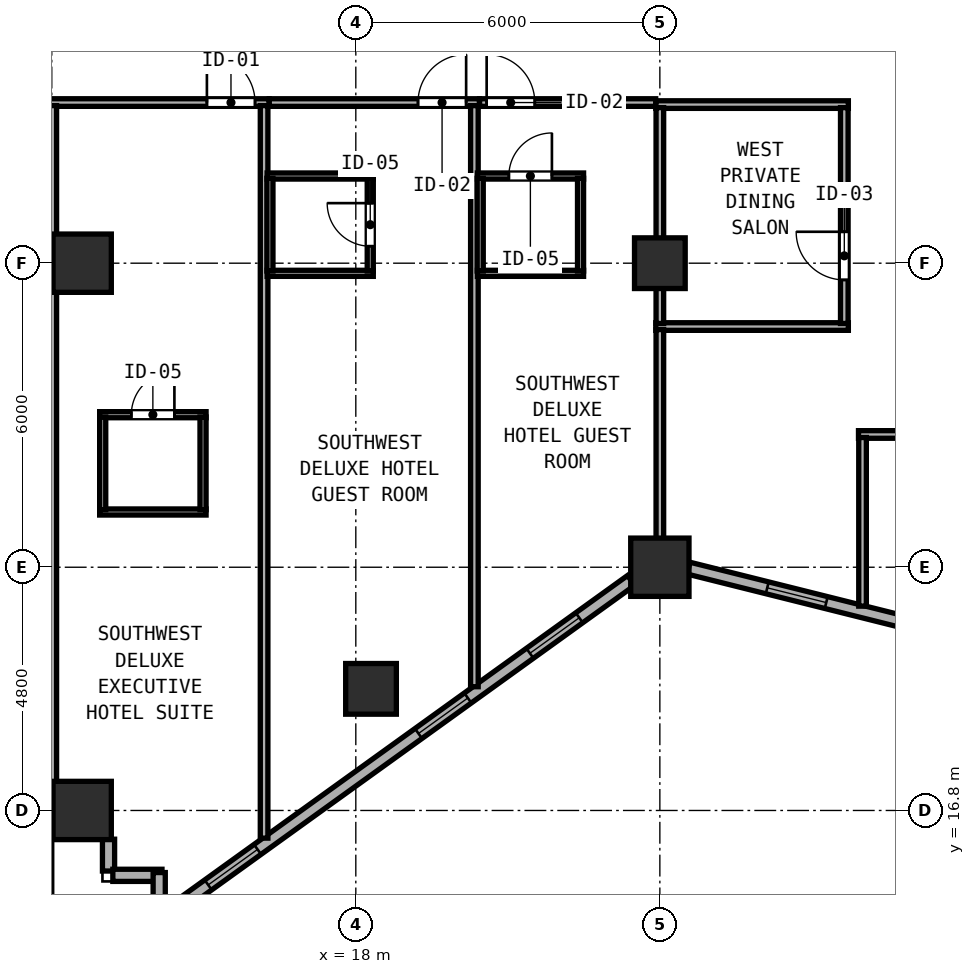
"""IFC4 building model, lengths in metres.
Left out: names, types, materials, properties, quantities, classifications, styles, units other than length and angle.
Written with IfcOpenShell. Run it as: python <this file> out.ifc"""

import sys

from ifc_helpers import new_model, si_unit, direction, frame, frame_2d, origin, origin_2d, place, context, subcontext, project, spatial, rectangle, hollow_rectangle, extrude, element, fill, save


model = new_model("IFC4")
c1 = context("Model", 3, precision=1e-05, world=origin(), true_north=direction((0.0, 1.0)))
c2 = subcontext(c1, "Body", "Model", "MODEL_VIEW")
j1 = project(units=[si_unit("LENGTHUNIT", "METRE"), si_unit("PLANEANGLEUNIT", "RADIAN")], contexts=[c1])
p1 = place(None, origin())
s1 = spatial("IfcSite", under=j1, at=p1, CompositionType="ELEMENT")
p2 = place(p1, origin())
s2 = spatial("IfcBuilding", under=s1, at=p2, CompositionType="ELEMENT")
p3 = place(p2, frame((0.0, 0.0, 85.6)))
s3 = spatial("IfcBuildingStorey", under=s2, at=p3, CompositionType="ELEMENT", Elevation=85.6)
for number, where, z_axis, x_axis in (
    (1, (24.0, 21.6, 0.0), (0.0, 0.0, 1.0), (1.0, 0.0, 0.0)),
    (2, (12.6, 16.8, 0.0), (0.0, 0.0, 1.0), (1.0, 0.0, 0.0)),
    (3, (12.6, 27.6, 0.0), (0.0, 0.0, 1.0), (1.0, 0.0, 0.0)),
):
    element("IfcColumn", number, at=place(p3, frame(where, z_axis=z_axis, x_axis=x_axis)), inside=s3, PredefinedType="COLUMN", context=c2, shape_type="SweptSolid", body=[
        extrude(hollow_rectangle(XDim=1.15, YDim=1.15, WallThickness=0.042, at=origin_2d()), origin(), (0.0, 0.0, 1.0), 3.8),
    ])
for number, where, z_axis, x_axis in (
    (4, (24.0, 27.6, 0.0), (0.0, 0.0, 1.0), (1.0, 0.0, 0.0)),
    (5, (18.3, 19.2, 0.0), (0.0, 0.0, 1.0), (1.0, 0.0, 0.0)),
):
    element("IfcColumn", number, at=place(p3, frame(where, z_axis=z_axis, x_axis=x_axis)), inside=s3, PredefinedType="COLUMN", context=c2, shape_type="SweptSolid", body=[
        extrude(hollow_rectangle(XDim=1.0, YDim=1.0, WallThickness=0.038, at=origin_2d()), origin(), (0.0, 0.0, 1.0), 3.8),
    ])
p4 = place(p3, frame((13.12, 16.233, 0.0), z_axis=(0.0, 0.0, 1.0), x_axis=(0.0, -1.0, 0.0)))
e6 = element("IfcWall", 6, at=p4, inside=s3, PredefinedType="SOLIDWALL", context=c2, shape_type="SweptSolid", body=[
    extrude(rectangle(XDim=0.628, YDim=0.24, at=frame_2d((0.314, 0.0))), origin(), (0.0, 0.0, 1.0), 3.54),
])
p5 = place(p3, frame((13.205, 15.52, 0.0), z_axis=(0.0, 0.0, 1.0), x_axis=(1.0, 0.0, 0.0)))
e7 = element("IfcWall", 7, at=p5, inside=s3, PredefinedType="SOLIDWALL", context=c2, shape_type="SweptSolid", body=[
    extrude(rectangle(XDim=0.97, YDim=0.24, at=frame_2d((0.485, 0.0))), origin(), (0.0, 0.0, 1.0), 3.54),
])
p6 = place(p3, frame((14.12, 15.575, 0.0), z_axis=(0.0, 0.0, 1.0), x_axis=(0.0, -1.0, 0.0)))
e8 = element("IfcWall", 8, at=p6, inside=s3, PredefinedType="SOLIDWALL", context=c2, shape_type="SweptSolid", body=[
    extrude(rectangle(XDim=0.996, YDim=0.24, at=frame_2d((0.498, 0.0))), origin(), (0.0, 0.0, 1.0), 3.54),
])
p7 = place(p3, frame((14.075, 14.602, 0.0), z_axis=(0.0, 0.0, 1.0), x_axis=(0.811543176492, 0.58429245476, 0.0)))
e9 = element("IfcWall", 9, at=p7, inside=s3, PredefinedType="SOLIDWALL", context=c2, shape_type="SweptSolid", body=[
    extrude(rectangle(XDim=11.531, YDim=0.24, at=frame_2d((5.765, 0.0))), origin(), (0.0, 0.0, 1.0), 3.037),
])
p8 = place(p7, frame((1.246, 0.0, 0.85)))
e10 = element("IfcOpeningElement", 10, at=p8, cuts=e9, PredefinedType="OPENING", context=c2, shape_type="SweptSolid", body=[
    extrude(rectangle(XDim=1.2, YDim=1.85, at=frame_2d((0.6, 0.925))), frame((0.0, 0.13, 0.0), z_axis=(0.0, -1.0, 0.0), x_axis=(1.0, 0.0, 0.0)), (0.0, 0.0, 1.0), 0.26),
])
p9 = place(p7, frame((6.36, 0.0, 0.85)))
e11 = element("IfcOpeningElement", 11, at=p9, cuts=e9, PredefinedType="OPENING", context=c2, shape_type="SweptSolid", body=[
    extrude(rectangle(XDim=1.2, YDim=1.85, at=frame_2d((0.6, 0.925))), frame((0.0, 0.13, 0.0), z_axis=(0.0, -1.0, 0.0), x_axis=(1.0, 0.0, 0.0)), (0.0, 0.0, 1.0), 0.26),
])
p10 = place(p7, frame((9.07, 0.0, 0.85)))
e12 = element("IfcOpeningElement", 12, at=p10, cuts=e9, PredefinedType="OPENING", context=c2, shape_type="SweptSolid", body=[
    extrude(rectangle(XDim=1.2, YDim=1.85, at=frame_2d((0.6, 0.925))), frame((0.0, 0.13, 0.0), z_axis=(0.0, -1.0, 0.0), x_axis=(1.0, 0.0, 0.0)), (0.0, 0.0, 1.0), 0.26),
])
p11 = place(p3, frame((24.567, 21.582, 0.0), z_axis=(0.0, 0.0, 1.0), x_axis=(0.970148978127, -0.24250971164, 0.0)))
e13 = element("IfcWall", 13, at=p11, inside=s3, PredefinedType="SOLIDWALL", context=c2, shape_type="SweptSolid", body=[
    extrude(rectangle(XDim=4.434, YDim=0.24, at=frame_2d((2.217, 0.0))), origin(), (0.0, 0.0, 1.0), 3.037),
])
p12 = place(p11, frame((1.6, 0.0, 0.85)))
e14 = element("IfcOpeningElement", 14, at=p12, cuts=e13, PredefinedType="OPENING", context=c2, shape_type="SweptSolid", body=[
    extrude(rectangle(XDim=1.2, YDim=1.85, at=frame_2d((0.6, 0.925))), frame((0.0, 0.13, 0.0), z_axis=(0.0, -1.0, 0.0), x_axis=(1.0, 0.0, 0.0)), (0.0, 0.0, 1.0), 0.26),
])
p13 = place(p3, frame((12.173, 33.524, 0.0), z_axis=(0.0, 0.0, 1.0), x_axis=(-0.963197271032, -0.268795493036, 0.0)))
e15 = element("IfcWall", 15, at=p13, inside=s3, PredefinedType="SOLIDWALL", context=c2, shape_type="SweptSolid", body=[
    extrude(rectangle(XDim=9.095, YDim=0.24, at=frame_2d((4.548, 0.0))), origin(), (0.0, 0.0, 1.0), 3.54),
])
p14 = place(p13, frame((1.6, 0.0, 0.85)))
e16 = element("IfcOpeningElement", 16, at=p14, cuts=e15, PredefinedType="OPENING", context=c2, shape_type="SweptSolid", body=[
    extrude(rectangle(XDim=1.2, YDim=1.85, at=frame_2d((0.6, 0.925))), frame((0.0, 0.13, 0.0), z_axis=(0.0, -1.0, 0.0), x_axis=(1.0, 0.0, 0.0)), (0.0, 0.0, 1.0), 0.26),
])
p15 = place(p13, frame((7.0, 0.0, 0.85)))
e17 = element("IfcOpeningElement", 17, at=p15, cuts=e15, PredefinedType="OPENING", context=c2, shape_type="SweptSolid", body=[
    extrude(rectangle(XDim=1.2, YDim=1.85, at=frame_2d((0.6, 0.925))), frame((0.0, 0.13, 0.0), z_axis=(0.0, -1.0, 0.0), x_axis=(1.0, 0.0, 0.0)), (0.0, 0.0, 1.0), 0.26),
])
for number, where, z_axis, x_axis in (
    (18, (23.92, 30.73, 0.0), (0.0, 0.0, 1.0), (1.0, 0.0, 0.0)),
    (19, (23.92, 26.35, 0.0), (0.0, 0.0, 1.0), (1.0, 0.0, 0.0)),
):
    element("IfcWall", number, at=place(p3, frame(where, z_axis=z_axis, x_axis=x_axis)), inside=s3, PredefinedType="PARTITIONING", context=c2, shape_type="SweptSolid", body=[
        extrude(rectangle(XDim=3.8, YDim=0.15, at=frame_2d((1.9, 0.0))), origin(), (0.0, 0.0, 1.0), 3.54),
    ])
p16 = place(p3, frame((24.0, 26.41, 0.0), z_axis=(0.0, 0.0, 1.0), x_axis=(0.0, 1.0, 0.0)))
e20 = element("IfcWall", 20, at=p16, inside=s3, PredefinedType="PARTITIONING", context=c2, shape_type="SweptSolid", body=[
    extrude(rectangle(XDim=4.26, YDim=0.15, at=frame_2d((2.13, 0.0))), origin(), (0.0, 0.0, 1.0), 3.037),
])
p17 = place(p3, frame((27.64, 26.41, 0.0), z_axis=(0.0, 0.0, 1.0), x_axis=(0.0, 1.0, 0.0)))
e21 = element("IfcWall", 21, at=p17, inside=s3, PredefinedType="PARTITIONING", context=c2, shape_type="SweptSolid", body=[
    extrude(rectangle(XDim=4.26, YDim=0.15, at=frame_2d((2.13, 0.0))), origin(), (0.0, 0.0, 1.0), 3.54),
])
p18 = place(p17, frame((1.81, 0.0, 0.0), z_axis=(0.0, 0.0, 1.0), x_axis=(-1.0, 0.0, 0.0)))
e22 = element("IfcOpeningElement", 22, at=p18, cuts=e21, PredefinedType="OPENING", context=c2, shape_type="SweptSolid", body=[
    extrude(rectangle(XDim=0.95, YDim=2.12, at=frame_2d((0.475, 1.06))), frame((0.0, 0.085, 0.0), z_axis=(0.0, -1.0, 0.0), x_axis=(1.0, 0.0, 0.0)), (0.0, 0.0, 1.0), 0.17),
])
p19 = place(p3, frame((27.92, 24.22, 0.0), z_axis=(0.0, 0.0, 1.0), x_axis=(1.0, 0.0, 0.0)))
e23 = element("IfcWall", 23, at=p19, inside=s3, PredefinedType="PARTITIONING", context=c2, shape_type="SweptSolid", body=[
    extrude(rectangle(XDim=7.36, YDim=0.15, at=frame_2d((3.68, 0.0))), origin(), (0.0, 0.0, 1.0), 3.54),
])
p20 = place(p19, frame((4.075, 0.0, 0.0), z_axis=(0.0, 0.0, 1.0), x_axis=(-1.0, 0.0, 0.0)))
e24 = element("IfcOpeningElement", 24, at=p20, cuts=e23, PredefinedType="OPENING", context=c2, shape_type="SweptSolid", body=[
    extrude(rectangle(XDim=0.95, YDim=2.12, at=frame_2d((0.475, 1.06))), frame((0.0, 0.085, 0.0), z_axis=(0.0, -1.0, 0.0), x_axis=(1.0, 0.0, 0.0)), (0.0, 0.0, 1.0), 0.17),
])
p21 = place(p3, frame((28.0, 20.832, 0.0), z_axis=(0.0, 0.0, 1.0), x_axis=(0.0, 1.0, 0.0)))
e25 = element("IfcWall", 25, at=p21, inside=s3, PredefinedType="PARTITIONING", context=c2, shape_type="SweptSolid", body=[
    extrude(rectangle(XDim=3.328, YDim=0.15, at=frame_2d((1.664, 0.0))), origin(), (0.0, 0.0, 1.0), 3.54),
])
p22 = place(p3, frame((11.7, 30.77, 0.0), z_axis=(0.0, 0.0, 1.0), x_axis=(1.0, 0.0, 0.0)))
e26 = element("IfcWall", 26, at=p22, inside=s3, PredefinedType="PARTITIONING", context=c2, shape_type="SweptSolid", body=[
    extrude(rectangle(XDim=4.59, YDim=0.15, at=frame_2d((2.295, 0.0))), origin(), (0.0, 0.0, 1.0), 3.54),
])
p23 = place(p22, frame((4.311, 0.0, 0.0), z_axis=(0.0, 0.0, 1.0), x_axis=(-1.0, 0.0, 0.0)))
e27 = element("IfcOpeningElement", 27, at=p23, cuts=e26, PredefinedType="OPENING", context=c2, shape_type="SweptSolid", body=[
    extrude(rectangle(XDim=0.95, YDim=2.18, at=frame_2d((0.475, 1.09))), frame((0.0, 0.085, 0.0), z_axis=(0.0, -1.0, 0.0), x_axis=(1.0, 0.0, 0.0)), (0.0, 0.0, 1.0), 0.17),
])
p24 = place(p3, frame((16.19, 16.254, 0.0), z_axis=(0.0, 0.0, 1.0), x_axis=(0.0, 1.0, 0.0)))
e28 = element("IfcWall", 28, at=p24, inside=s3, PredefinedType="PARTITIONING", context=c2, shape_type="SweptSolid", body=[
    extrude(rectangle(XDim=14.456, YDim=0.15, at=frame_2d((7.228, 0.0))), origin(), (0.0, 0.0, 1.0), 3.54),
])
p25 = place(p3, frame((12.945, 24.61, 0.0), z_axis=(0.0, 0.0, 1.0), x_axis=(1.0, 0.0, 0.0)))
e29 = element("IfcWall", 29, at=p25, inside=s3, PredefinedType="PARTITIONING", context=c2, shape_type="SweptSolid", body=[
    extrude(rectangle(XDim=2.1, YDim=0.12, at=frame_2d((1.05, 0.0))), origin(), (0.0, 0.0, 1.0), 3.54),
])
p26 = place(p25, frame((1.475, 0.0, 0.0), z_axis=(0.0, 0.0, 1.0), x_axis=(-1.0, 0.0, 0.0)))
e30 = element("IfcOpeningElement", 30, at=p26, cuts=e29, PredefinedType="OPENING", context=c2, shape_type="SweptSolid", body=[
    extrude(rectangle(XDim=0.85, YDim=2.1, at=frame_2d((0.425, 1.05))), frame((0.0, 0.07, 0.0), z_axis=(0.0, -1.0, 0.0), x_axis=(1.0, 0.0, 0.0)), (0.0, 0.0, 1.0), 0.14),
])
p27 = place(p3, frame((12.945, 22.69, 0.0), z_axis=(0.0, 0.0, 1.0), x_axis=(1.0, 0.0, 0.0)))
e31 = element("IfcWall", 31, at=p27, inside=s3, PredefinedType="PARTITIONING", context=c2, shape_type="SweptSolid", body=[
    extrude(rectangle(XDim=2.1, YDim=0.12, at=frame_2d((1.05, 0.0))), origin(), (0.0, 0.0, 1.0), 3.54),
])
for number, where, z_axis, x_axis in (
    (32, (13.005, 22.735, 0.0), (0.0, 0.0, 1.0), (0.0, 1.0, 0.0)),
    (33, (14.985, 22.735, 0.0), (0.0, 0.0, 1.0), (0.0, 1.0, 0.0)),
):
    element("IfcWall", number, at=place(p3, frame(where, z_axis=z_axis, x_axis=x_axis)), inside=s3, PredefinedType="PARTITIONING", context=c2, shape_type="SweptSolid", body=[
        extrude(rectangle(XDim=1.83, YDim=0.12, at=frame_2d((0.915, 0.0))), origin(), (0.0, 0.0, 1.0), 3.54),
    ])
p28 = place(p3, frame((16.292, 30.77, 0.0), z_axis=(0.0, 0.0, 1.0), x_axis=(1.0, 0.0, 0.0)))
e34 = element("IfcWall", 34, at=p28, inside=s3, PredefinedType="PARTITIONING", context=c2, shape_type="SweptSolid", body=[
    extrude(rectangle(XDim=4.148, YDim=0.15, at=frame_2d((2.074, 0.0))), origin(), (0.0, 0.0, 1.0), 3.54),
])
p29 = place(p28, frame((3.885, 0.0, 0.0), z_axis=(0.0, 0.0, 1.0), x_axis=(-1.0, 0.0, 0.0)))
e35 = element("IfcOpeningElement", 35, at=p29, cuts=e34, PredefinedType="OPENING", context=c2, shape_type="SweptSolid", body=[
    extrude(rectangle(XDim=0.95, YDim=2.15, at=frame_2d((0.475, 1.075))), frame((0.0, 0.085, 0.0), z_axis=(0.0, -1.0, 0.0), x_axis=(1.0, 0.0, 0.0)), (0.0, 0.0, 1.0), 0.17),
])
p30 = place(p3, frame((20.34, 19.242, 0.0), z_axis=(0.0, 0.0, 1.0), x_axis=(0.0, 1.0, 0.0)))
e36 = element("IfcWall", 36, at=p30, inside=s3, PredefinedType="PARTITIONING", context=c2, shape_type="SweptSolid", body=[
    extrude(rectangle(XDim=11.468, YDim=0.15, at=frame_2d((5.734, 0.0))), origin(), (0.0, 0.0, 1.0), 3.54),
])
p31 = place(p3, frame((16.25, 29.32, 0.0), z_axis=(0.0, 0.0, 1.0), x_axis=(1.0, 0.0, 0.0)))
e37 = element("IfcWall", 37, at=p31, inside=s3, PredefinedType="PARTITIONING", context=c2, shape_type="SweptSolid", body=[
    extrude(rectangle(XDim=2.095, YDim=0.12, at=frame_2d((1.047, 0.0))), origin(), (0.0, 0.0, 1.0), 3.54),
])
p32 = place(p3, frame((16.25, 27.4, 0.0), z_axis=(0.0, 0.0, 1.0), x_axis=(1.0, 0.0, 0.0)))
e38 = element("IfcWall", 38, at=p32, inside=s3, PredefinedType="PARTITIONING", context=c2, shape_type="SweptSolid", body=[
    extrude(rectangle(XDim=2.095, YDim=0.12, at=frame_2d((1.047, 0.0))), origin(), (0.0, 0.0, 1.0), 3.037),
])
p33 = place(p3, frame((16.305, 27.445, 0.0), z_axis=(0.0, 0.0, 1.0), x_axis=(0.0, 1.0, 0.0)))
e39 = element("IfcWall", 39, at=p33, inside=s3, PredefinedType="PARTITIONING", context=c2, shape_type="SweptSolid", body=[
    extrude(rectangle(XDim=1.83, YDim=0.12, at=frame_2d((0.915, 0.0))), origin(), (0.0, 0.0, 1.0), 3.54),
])
p34 = place(p3, frame((18.285, 27.445, 0.0), z_axis=(0.0, 0.0, 1.0), x_axis=(0.0, 1.0, 0.0)))
e40 = element("IfcWall", 40, at=p34, inside=s3, PredefinedType="PARTITIONING", context=c2, shape_type="SweptSolid", body=[
    extrude(rectangle(XDim=1.83, YDim=0.12, at=frame_2d((0.915, 0.0))), origin(), (0.0, 0.0, 1.0), 3.54),
])
p35 = place(p34, frame((0.49, 0.0, 0.0)))
e41 = element("IfcOpeningElement", 41, at=p35, cuts=e40, PredefinedType="OPENING", context=c2, shape_type="SweptSolid", body=[
    extrude(rectangle(XDim=0.85, YDim=2.1, at=frame_2d((0.425, 1.05))), frame((0.0, 0.07, 0.0), z_axis=(0.0, -1.0, 0.0), x_axis=(1.0, 0.0, 0.0)), (0.0, 0.0, 1.0), 0.14),
])
p36 = place(p3, frame((20.442, 30.77, 0.0), z_axis=(0.0, 0.0, 1.0), x_axis=(1.0, 0.0, 0.0)))
e42 = element("IfcWall", 42, at=p36, inside=s3, PredefinedType="PARTITIONING", context=c2, shape_type="SweptSolid", body=[
    extrude(rectangle(XDim=3.476, YDim=0.15, at=frame_2d((1.738, 0.0))), origin(), (0.0, 0.0, 1.0), 3.54),
])
p37 = place(p36, frame((1.09, 0.0, 0.0), z_axis=(0.0, 0.0, 1.0), x_axis=(-1.0, 0.0, 0.0)))
e43 = element("IfcOpeningElement", 43, at=p37, cuts=e42, PredefinedType="OPENING", context=c2, shape_type="SweptSolid", body=[
    extrude(rectangle(XDim=0.95, YDim=2.15, at=frame_2d((0.475, 1.075))), frame((0.0, 0.085, 0.0), z_axis=(0.0, -1.0, 0.0), x_axis=(1.0, 0.0, 0.0)), (0.0, 0.0, 1.0), 0.17),
])
p38 = place(p3, frame((24.0, 21.819, 0.0), z_axis=(0.0, 0.0, 1.0), x_axis=(0.0, 1.0, 0.0)))
e44 = element("IfcWall", 44, at=p38, inside=s3, PredefinedType="PARTITIONING", context=c2, shape_type="SweptSolid", body=[
    extrude(rectangle(XDim=4.471, YDim=0.15, at=frame_2d((2.236, 0.0))), origin(), (0.0, 0.0, 1.0), 3.037),
])
p39 = place(p3, frame((20.4, 29.32, 0.0), z_axis=(0.0, 0.0, 1.0), x_axis=(1.0, 0.0, 0.0)))
e45 = element("IfcWall", 45, at=p39, inside=s3, PredefinedType="PARTITIONING", context=c2, shape_type="SweptSolid", body=[
    extrude(rectangle(XDim=2.095, YDim=0.12, at=frame_2d((1.048, 0.0))), origin(), (0.0, 0.0, 1.0), 3.54),
])
p40 = place(p39, frame((1.47, 0.0, 0.0), z_axis=(0.0, 0.0, 1.0), x_axis=(-1.0, 0.0, 0.0)))
e46 = element("IfcOpeningElement", 46, at=p40, cuts=e45, PredefinedType="OPENING", context=c2, shape_type="SweptSolid", body=[
    extrude(rectangle(XDim=0.85, YDim=2.1, at=frame_2d((0.425, 1.05))), frame((0.0, 0.07, 0.0), z_axis=(0.0, -1.0, 0.0), x_axis=(1.0, 0.0, 0.0)), (0.0, 0.0, 1.0), 0.14),
])
p41 = place(p3, frame((20.4, 27.4, 0.0), z_axis=(0.0, 0.0, 1.0), x_axis=(1.0, 0.0, 0.0)))
e47 = element("IfcWall", 47, at=p41, inside=s3, PredefinedType="PARTITIONING", context=c2, shape_type="SweptSolid", body=[
    extrude(rectangle(XDim=2.095, YDim=0.12, at=frame_2d((1.048, 0.0))), origin(), (0.0, 0.0, 1.0), 3.037),
])
for number, where, z_axis, x_axis in (
    (48, (20.455, 27.445, 0.0), (0.0, 0.0, 1.0), (0.0, 1.0, 0.0)),
    (49, (22.435, 27.445, 0.0), (0.0, 0.0, 1.0), (0.0, 1.0, 0.0)),
):
    element("IfcWall", number, at=place(p3, frame(where, z_axis=z_axis, x_axis=x_axis)), inside=s3, PredefinedType="PARTITIONING", context=c2, shape_type="SweptSolid", body=[
        extrude(rectangle(XDim=1.83, YDim=0.12, at=frame_2d((0.915, 0.0))), origin(), (0.0, 0.0, 1.0), 3.54),
    ])
p42 = place(p3, frame((12.02, 16.612, 0.0), z_axis=(0.0, 0.0, 1.0), x_axis=(0.0, 1.0, 0.0)))
e50 = element("IfcWall", 50, at=p42, inside=s3, PredefinedType="PARTITIONING", context=c2, shape_type="SweptSolid", body=[
    extrude(rectangle(XDim=14.098, YDim=0.15, at=frame_2d((7.049, 0.0))), origin(), (0.0, 0.0, 1.0), 3.54),
])
p43 = place(p8, origin())
e51 = element("IfcWindow", 51, at=p43, inside=s3, PartitioningType="SINGLE_PANEL", PredefinedType="WINDOW", context=c2, shape_type="SweptSolid", body=[
    extrude(rectangle(XDim=1.2, YDim=1.85, at=frame_2d((0.6, 0.925))), frame((0.0, 0.03, 0.0), z_axis=(0.0, -1.0, 0.0), x_axis=(1.0, 0.0, 0.0)), (0.0, 0.0, 1.0), 0.06),
])
fill(e10, e51)
p44 = place(p9, origin())
e52 = element("IfcWindow", 52, at=p44, inside=s3, PartitioningType="SINGLE_PANEL", PredefinedType="WINDOW", context=c2, shape_type="SweptSolid", body=[
    extrude(rectangle(XDim=1.2, YDim=1.85, at=frame_2d((0.6, 0.925))), frame((0.0, 0.03, 0.0), z_axis=(0.0, -1.0, 0.0), x_axis=(1.0, 0.0, 0.0)), (0.0, 0.0, 1.0), 0.06),
])
fill(e11, e52)
p45 = place(p12, origin())
e53 = element("IfcWindow", 53, at=p45, inside=s3, PartitioningType="SINGLE_PANEL", PredefinedType="WINDOW", context=c2, shape_type="SweptSolid", body=[
    extrude(rectangle(XDim=1.2, YDim=1.85, at=frame_2d((0.6, 0.925))), frame((0.0, 0.03, 0.0), z_axis=(0.0, -1.0, 0.0), x_axis=(1.0, 0.0, 0.0)), (0.0, 0.0, 1.0), 0.06),
])
fill(e14, e53)
p46 = place(p18, origin())
e54 = element("IfcDoor", 54, at=p46, inside=s3, OperationType="SINGLE_SWING_LEFT", PredefinedType="DOOR", context=c2, shape_type="SweptSolid", body=[
    extrude(rectangle(XDim=0.95, YDim=2.12, at=frame_2d((0.475, 1.06))), frame((0.0, 0.025, 0.0), z_axis=(0.0, -1.0, 0.0), x_axis=(1.0, 0.0, 0.0)), (0.0, 0.0, 1.0), 0.05),
])
fill(e22, e54)
p47 = place(p23, origin())
e55 = element("IfcDoor", 55, at=p47, inside=s3, OperationType="SINGLE_SWING_RIGHT", PredefinedType="DOOR", context=c2, shape_type="SweptSolid", body=[
    extrude(rectangle(XDim=0.95, YDim=2.18, at=frame_2d((0.475, 1.09))), frame((0.0, 0.025, 0.0), z_axis=(0.0, -1.0, 0.0), x_axis=(1.0, 0.0, 0.0)), (0.0, 0.0, 1.0), 0.05),
])
fill(e27, e55)
p48 = place(p26, origin())
e56 = element("IfcDoor", 56, at=p48, inside=s3, OperationType="SINGLE_SWING_LEFT", PredefinedType="DOOR", context=c2, shape_type="SweptSolid", body=[
    extrude(rectangle(XDim=0.85, YDim=2.1, at=frame_2d((0.425, 1.05))), frame((0.0, 0.025, 0.0), z_axis=(0.0, -1.0, 0.0), x_axis=(1.0, 0.0, 0.0)), (0.0, 0.0, 1.0), 0.05),
])
fill(e30, e56)
p49 = place(p29, origin())
e57 = element("IfcDoor", 57, at=p49, inside=s3, OperationType="SINGLE_SWING_LEFT", PredefinedType="DOOR", context=c2, shape_type="SweptSolid", body=[
    extrude(rectangle(XDim=0.95, YDim=2.15, at=frame_2d((0.475, 1.075))), frame((0.0, 0.025, 0.0), z_axis=(0.0, -1.0, 0.0), x_axis=(1.0, 0.0, 0.0)), (0.0, 0.0, 1.0), 0.05),
])
fill(e35, e57)
p50 = place(p35, origin())
e58 = element("IfcDoor", 58, at=p50, inside=s3, OperationType="SINGLE_SWING_RIGHT", PredefinedType="DOOR", context=c2, shape_type="SweptSolid", body=[
    extrude(rectangle(XDim=0.85, YDim=2.1, at=frame_2d((0.425, 1.05))), frame((0.0, 0.025, 0.0), z_axis=(0.0, -1.0, 0.0), x_axis=(1.0, 0.0, 0.0)), (0.0, 0.0, 1.0), 0.05),
])
fill(e41, e58)
p51 = place(p37, origin())
e59 = element("IfcDoor", 59, at=p51, inside=s3, OperationType="SINGLE_SWING_RIGHT", PredefinedType="DOOR", context=c2, shape_type="SweptSolid", body=[
    extrude(rectangle(XDim=0.95, YDim=2.15, at=frame_2d((0.475, 1.075))), frame((0.0, 0.025, 0.0), z_axis=(0.0, -1.0, 0.0), x_axis=(1.0, 0.0, 0.0)), (0.0, 0.0, 1.0), 0.05),
])
fill(e43, e59)
p52 = place(p40, origin())
e60 = element("IfcDoor", 60, at=p52, inside=s3, OperationType="SINGLE_SWING_LEFT", PredefinedType="DOOR", context=c2, shape_type="SweptSolid", body=[
    extrude(rectangle(XDim=0.85, YDim=2.1, at=frame_2d((0.425, 1.05))), frame((0.0, 0.025, 0.0), z_axis=(0.0, -1.0, 0.0), x_axis=(1.0, 0.0, 0.0)), (0.0, 0.0, 1.0), 0.05),
])
fill(e46, e60)
p53 = place(p10, origin())
e61 = element("IfcWindow", 61, at=p53, inside=s3, PartitioningType="SINGLE_PANEL", PredefinedType="WINDOW", context=c2, shape_type="SweptSolid", body=[
    extrude(rectangle(XDim=1.2, YDim=1.85, at=frame_2d((0.6, 0.925))), frame((0.0, 0.03, 0.0), z_axis=(0.0, -1.0, 0.0), x_axis=(1.0, 0.0, 0.0)), (0.0, 0.0, 1.0), 0.06),
])
fill(e12, e61)
save(model, sys.argv[1])
